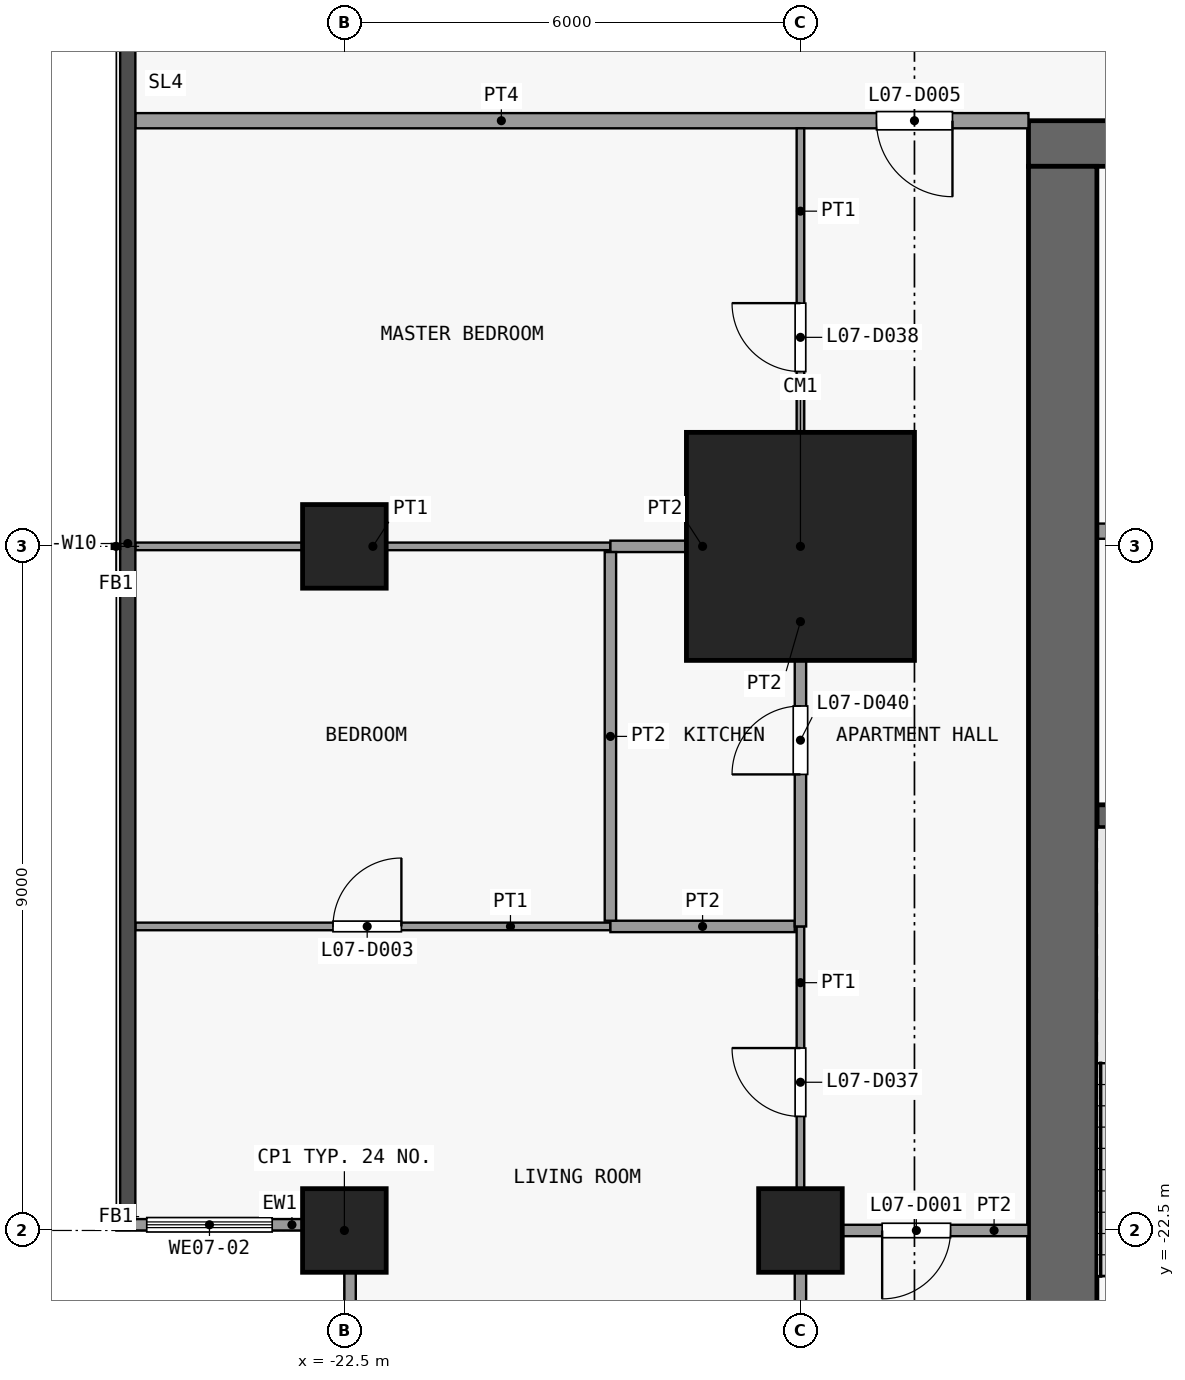
"""IFC4 building model, lengths in metres.
Left out: names, types, materials, properties, quantities, classifications, styles, units other than length and angle.
Written with IfcOpenShell. Run it as: python <this file> out.ifc"""

import sys

from ifc_helpers import new_model, si_unit, direction, frame, frame_2d, origin, origin_2d, place, context, subcontext, project, spatial, rectangle, extrude, element, fill, save


model = new_model("IFC4")
c1 = context("Model", 3, precision=1e-05, world=origin(), true_north=direction((0.0, 1.0)))
c2 = subcontext(c1, "Body", "Model", "MODEL_VIEW")
j1 = project(units=[si_unit("LENGTHUNIT", "METRE"), si_unit("PLANEANGLEUNIT", "RADIAN")], contexts=[c1])
p1 = place(None, origin())
s1 = spatial("IfcSite", under=j1, at=p1, CompositionType="ELEMENT")
p2 = place(p1, origin())
s2 = spatial("IfcBuilding", under=s1, at=p2, CompositionType="ELEMENT")
p3 = place(p2, frame((0.0, 0.0, 36.1)))
s3 = spatial("IfcBuildingStorey", under=s2, at=p3, CompositionType="ELEMENT", Elevation=36.1)
for number, where, z_axis, x_axis in (
    (1, (-22.5, -22.5, 0.0), (0.0, 0.0, 1.0), (1.0, 0.0, 0.0)),
    (2, (-22.5, -13.5, 0.0), (0.0, 0.0, 1.0), (1.0, 0.0, 0.0)),
    (3, (-16.5, -22.5, 0.0), (0.0, 0.0, 1.0), (1.0, 0.0, 0.0)),
):
    element("IfcColumn", number, at=place(p3, frame(where, z_axis=z_axis, x_axis=x_axis)), inside=s3, PredefinedType="COLUMN", context=c2, shape_type="SweptSolid", body=[
        extrude(rectangle(XDim=1.1, YDim=1.1, at=origin_2d()), origin(), (0.0, 0.0, 1.0), 3.6),
    ])
p4 = place(p3, frame((-16.5, -13.5, 0.0), z_axis=(0.0, 0.0, 1.0), x_axis=(1.0, 0.0, 0.0)))
e4 = element("IfcColumn", 4, at=p4, inside=s3, PredefinedType="COLUMN", context=c2, shape_type="SweptSolid", body=[
    extrude(rectangle(XDim=3.0, YDim=3.0, at=origin_2d()), origin(), (0.0, 0.0, 1.0), 3.6),
])
p5 = place(p3, frame((-13.5, -8.2, 0.0), z_axis=(0.0, 0.0, 1.0), x_axis=(1.0, 0.0, 0.0)))
e5 = element("IfcWall", 5, at=p5, inside=s3, PredefinedType="SHEAR", context=c2, shape_type="SweptSolid", body=[
    extrude(rectangle(XDim=27.0, YDim=0.6, at=frame_2d((13.5, 0.0))), origin(), (0.0, 0.0, 1.0), 3.3),
])
p6 = place(p5, frame((7.8, 0.0, 0.0)))
e6 = element("IfcOpeningElement", 6, at=p6, cuts=e5, PredefinedType="OPENING", context=c2, shape_type="SweptSolid", body=[
    extrude(rectangle(XDim=1.8, YDim=2.1, at=frame_2d((0.9, 1.05))), frame((0.0, 0.31, 0.0), z_axis=(0.0, -1.0, 0.0), x_axis=(1.0, 0.0, 0.0)), (0.0, 0.0, 1.0), 0.62),
])
p7 = place(p5, frame((17.4, 0.0, 0.0)))
e7 = element("IfcOpeningElement", 7, at=p7, cuts=e5, PredefinedType="OPENING", context=c2, shape_type="SweptSolid", body=[
    extrude(rectangle(XDim=1.8, YDim=2.1, at=frame_2d((0.9, 1.05))), frame((0.0, 0.31, 0.0), z_axis=(0.0, -1.0, 0.0), x_axis=(1.0, 0.0, 0.0)), (0.0, 0.0, 1.0), 0.62),
])
p8 = place(p5, frame((2.725, 0.0, 0.0)))
e8 = element("IfcOpeningElement", 8, at=p8, cuts=e5, PredefinedType="OPENING", context=c2, shape_type="SweptSolid", body=[
    extrude(rectangle(XDim=0.9, YDim=2.1, at=frame_2d((0.45, 1.05))), frame((0.0, 0.31, 0.0), z_axis=(0.0, -1.0, 0.0), x_axis=(1.0, 0.0, 0.0)), (0.0, 0.0, 1.0), 0.62),
])
p9 = place(p5, frame((23.375, 0.0, 0.0)))
e9 = element("IfcOpeningElement", 9, at=p9, cuts=e5, PredefinedType="OPENING", context=c2, shape_type="SweptSolid", body=[
    extrude(rectangle(XDim=0.9, YDim=2.1, at=frame_2d((0.45, 1.05))), frame((0.0, 0.31, 0.0), z_axis=(0.0, -1.0, 0.0), x_axis=(1.0, 0.0, 0.0)), (0.0, 0.0, 1.0), 0.62),
])
p10 = place(p3, frame((-13.05, -24.6, 0.0), z_axis=(0.0, 0.0, 1.0), x_axis=(0.0, 1.0, 0.0)))
e10 = element("IfcWall", 10, at=p10, inside=s3, PredefinedType="SHEAR", context=c2, shape_type="SweptSolid", body=[
    extrude(rectangle(XDim=16.1, YDim=0.9, at=frame_2d((8.05, 0.0))), origin(), (0.0, 0.0, 1.0), 3.3),
])
p11 = place(p3, frame((-12.6, -17.05, 0.0), z_axis=(0.0, 0.0, 1.0), x_axis=(1.0, 0.0, 0.0)))
e11 = element("IfcWall", 11, at=p11, inside=s3, PredefinedType="SHEAR", context=c2, shape_type="SweptSolid", body=[
    extrude(rectangle(XDim=2.85, YDim=0.3, at=frame_2d((1.425, 0.0))), origin(), (0.0, 0.0, 1.0), 3.3),
])
p12 = place(p3, frame((-12.6, -13.3, 0.0), z_axis=(0.0, 0.0, 1.0), x_axis=(1.0, 0.0, 0.0)))
e12 = element("IfcWall", 12, at=p12, inside=s3, PredefinedType="PARTITIONING", context=c2, shape_type="SweptSolid", body=[
    extrude(rectangle(XDim=1.45, YDim=0.2, at=frame_2d((0.725, 0.0))), origin(), (0.0, 0.0, 1.0), 3.3),
])
p13 = place(p3, frame((-22.425, -25.25, 0.0), z_axis=(0.0, 0.0, 1.0), x_axis=(0.0, 1.0, 0.0)))
e13 = element("IfcWall", 13, at=p13, inside=s3, PredefinedType="SOLIDWALL", context=c2, shape_type="SweptSolid", body=[
    extrude(rectangle(XDim=2.2, YDim=0.15, at=frame_2d((1.1, 0.0))), origin(), (0.0, 0.0, 1.0), 3.3),
])
p14 = place(p13, frame((0.4, 0.0, 0.9)))
e14 = element("IfcOpeningElement", 14, at=p14, cuts=e13, PredefinedType="OPENING", context=c2, shape_type="SweptSolid", body=[
    extrude(rectangle(XDim=1.4, YDim=2.4, at=frame_2d((0.7, 1.2))), frame((0.0, 0.085, 0.0), z_axis=(0.0, -1.0, 0.0), x_axis=(1.0, 0.0, 0.0)), (0.0, 0.0, 1.0), 0.17),
])
p15 = place(p3, frame((-23.05, -22.425, 0.0), z_axis=(0.0, 0.0, 1.0), x_axis=(-1.0, 0.0, 0.0)))
e15 = element("IfcWall", 15, at=p15, inside=s3, PredefinedType="SOLIDWALL", context=c2, shape_type="SweptSolid", body=[
    extrude(rectangle(XDim=2.45, YDim=0.15, at=frame_2d((1.225, 0.0))), origin(), (0.0, 0.0, 1.0), 3.3),
])
p16 = place(p15, frame((0.4, 0.0, 0.9)))
e16 = element("IfcOpeningElement", 16, at=p16, cuts=e15, PredefinedType="OPENING", context=c2, shape_type="SweptSolid", body=[
    extrude(rectangle(XDim=1.65, YDim=2.4, at=frame_2d((0.825, 1.2))), frame((0.0, 0.085, 0.0), z_axis=(0.0, -1.0, 0.0), x_axis=(1.0, 0.0, 0.0)), (0.0, 0.0, 1.0), 0.17),
])
p17 = place(p3, frame((-16.425, -22.5, 0.0), z_axis=(0.0, 0.0, 1.0), x_axis=(1.0, 0.0, 0.0)))
e17 = element("IfcWall", 17, at=p17, inside=s3, PredefinedType="PARTITIONING", context=c2, shape_type="SweptSolid", body=[
    extrude(rectangle(XDim=2.925, YDim=0.15, at=frame_2d((1.462, 0.0))), origin(), (0.0, 0.0, 1.0), 3.3),
])
p18 = place(p17, frame((1.0, 0.0, 0.0)))
e18 = element("IfcOpeningElement", 18, at=p18, cuts=e17, PredefinedType="OPENING", context=c2, shape_type="SweptSolid", body=[
    extrude(rectangle(XDim=0.9, YDim=2.1, at=frame_2d((0.45, 1.05))), frame((0.0, 0.085, 0.0), z_axis=(0.0, -1.0, 0.0), x_axis=(1.0, 0.0, 0.0)), (0.0, 0.0, 1.0), 0.17),
])
p19 = place(p3, frame((-25.25, -18.5, 0.0), z_axis=(0.0, 0.0, 1.0), x_axis=(1.0, 0.0, 0.0)))
e19 = element("IfcWall", 19, at=p19, inside=s3, PredefinedType="PARTITIONING", context=c2, shape_type="SweptSolid", body=[
    extrude(rectangle(XDim=6.25, YDim=0.1, at=frame_2d((3.125, 0.0))), origin(), (0.0, 0.0, 1.0), 3.3),
])
p20 = place(p19, frame((2.6, 0.0, 0.0)))
e20 = element("IfcOpeningElement", 20, at=p20, cuts=e19, PredefinedType="OPENING", context=c2, shape_type="SweptSolid", body=[
    extrude(rectangle(XDim=0.9, YDim=2.1, at=frame_2d((0.45, 1.05))), frame((0.0, 0.06, 0.0), z_axis=(0.0, -1.0, 0.0), x_axis=(1.0, 0.0, 0.0)), (0.0, 0.0, 1.0), 0.12),
])
p21 = place(p3, frame((-19.0, -18.5, 0.0), z_axis=(0.0, 0.0, 1.0), x_axis=(1.0, 0.0, 0.0)))
e21 = element("IfcWall", 21, at=p21, inside=s3, PredefinedType="PARTITIONING", context=c2, shape_type="SweptSolid", body=[
    extrude(rectangle(XDim=2.425, YDim=0.15, at=frame_2d((1.212, 0.0))), origin(), (0.0, 0.0, 1.0), 3.3),
])
p22 = place(p3, frame((-25.25, -13.5, 0.0), z_axis=(0.0, 0.0, 1.0), x_axis=(1.0, 0.0, 0.0)))
e22 = element("IfcWall", 22, at=p22, inside=s3, PredefinedType="PARTITIONING", context=c2, shape_type="SweptSolid", body=[
    extrude(rectangle(XDim=6.25, YDim=0.1, at=frame_2d((3.125, 0.0))), origin(), (0.0, 0.0, 1.0), 3.3),
])
p23 = place(p3, frame((-19.0, -13.5, 0.0), z_axis=(0.0, 0.0, 1.0), x_axis=(1.0, 0.0, 0.0)))
e23 = element("IfcWall", 23, at=p23, inside=s3, PredefinedType="PARTITIONING", context=c2, shape_type="SweptSolid", body=[
    extrude(rectangle(XDim=2.425, YDim=0.15, at=frame_2d((1.212, 0.0))), origin(), (0.0, 0.0, 1.0), 3.3),
])
p24 = place(p3, frame((-25.25, -7.9, 0.0), z_axis=(0.0, 0.0, 1.0), x_axis=(1.0, 0.0, 0.0)))
e24 = element("IfcWall", 24, at=p24, inside=s3, PredefinedType="PARTITIONING", context=c2, shape_type="SweptSolid", body=[
    extrude(rectangle(XDim=11.75, YDim=0.2, at=frame_2d((5.875, 0.0))), origin(), (0.0, 0.0, 1.0), 3.3),
])
p25 = place(p24, frame((9.75, 0.0, 0.0)))
e25 = element("IfcOpeningElement", 25, at=p25, cuts=e24, PredefinedType="OPENING", context=c2, shape_type="SweptSolid", body=[
    extrude(rectangle(XDim=1.0, YDim=2.1, at=frame_2d((0.5, 1.05))), frame((0.0, 0.11, 0.0), z_axis=(0.0, -1.0, 0.0), x_axis=(1.0, 0.0, 0.0)), (0.0, 0.0, 1.0), 0.22),
])
p26 = place(p3, frame((-19.0, -18.425, 0.0), z_axis=(0.0, 0.0, 1.0), x_axis=(0.0, 1.0, 0.0)))
e26 = element("IfcWall", 26, at=p26, inside=s3, PredefinedType="PARTITIONING", context=c2, shape_type="SweptSolid", body=[
    extrude(rectangle(XDim=4.85, YDim=0.15, at=frame_2d((2.425, 0.0))), origin(), (0.0, 0.0, 1.0), 3.3),
])
p27 = place(p3, frame((-16.5, -22.5, 0.0), z_axis=(0.0, 0.0, 1.0), x_axis=(0.0, 1.0, 0.0)))
e27 = element("IfcWall", 27, at=p27, inside=s3, PredefinedType="PARTITIONING", context=c2, shape_type="SweptSolid", body=[
    extrude(rectangle(XDim=4.0, YDim=0.1, at=frame_2d((2.0, 0.0))), origin(), (0.0, 0.0, 1.0), 3.3),
])
p28 = place(p27, frame((1.5, 0.0, 0.0)))
e28 = element("IfcOpeningElement", 28, at=p28, cuts=e27, PredefinedType="OPENING", context=c2, shape_type="SweptSolid", body=[
    extrude(rectangle(XDim=0.9, YDim=2.1, at=frame_2d((0.45, 1.05))), frame((0.0, 0.06, 0.0), z_axis=(0.0, -1.0, 0.0), x_axis=(1.0, 0.0, 0.0)), (0.0, 0.0, 1.0), 0.12),
])
p29 = place(p3, frame((-16.5, -13.5, 0.0), z_axis=(0.0, 0.0, 1.0), x_axis=(0.0, 1.0, 0.0)))
e29 = element("IfcWall", 29, at=p29, inside=s3, PredefinedType="PARTITIONING", context=c2, shape_type="SweptSolid", body=[
    extrude(rectangle(XDim=5.5, YDim=0.1, at=frame_2d((2.75, 0.0))), origin(), (0.0, 0.0, 1.0), 3.3),
])
p30 = place(p29, frame((2.3, 0.0, 0.0)))
e30 = element("IfcOpeningElement", 30, at=p30, cuts=e29, PredefinedType="OPENING", context=c2, shape_type="SweptSolid", body=[
    extrude(rectangle(XDim=0.9, YDim=2.1, at=frame_2d((0.45, 1.05))), frame((0.0, 0.06, 0.0), z_axis=(0.0, -1.0, 0.0), x_axis=(1.0, 0.0, 0.0)), (0.0, 0.0, 1.0), 0.12),
])
p31 = place(p3, frame((-16.5, -25.25, 0.0), z_axis=(0.0, 0.0, 1.0), x_axis=(0.0, 1.0, 0.0)))
e31 = element("IfcWall", 31, at=p31, inside=s3, PredefinedType="PARTITIONING", context=c2, shape_type="SweptSolid", body=[
    extrude(rectangle(XDim=2.75, YDim=0.15, at=frame_2d((1.375, 0.0))), origin(), (0.0, 0.0, 1.0), 3.3),
])
p32 = place(p3, frame((-16.5, -18.5, 0.0), z_axis=(0.0, 0.0, 1.0), x_axis=(0.0, 1.0, 0.0)))
e32 = element("IfcWall", 32, at=p32, inside=s3, PredefinedType="PARTITIONING", context=c2, shape_type="SweptSolid", body=[
    extrude(rectangle(XDim=5.0, YDim=0.15, at=frame_2d((2.5, 0.0))), origin(), (0.0, 0.0, 1.0), 3.3),
])
p33 = place(p32, frame((2.0, 0.0, 0.0)))
e33 = element("IfcOpeningElement", 33, at=p33, cuts=e32, PredefinedType="OPENING", context=c2, shape_type="SweptSolid", body=[
    extrude(rectangle(XDim=0.9, YDim=2.1, at=frame_2d((0.45, 1.05))), frame((0.0, 0.085, 0.0), z_axis=(0.0, -1.0, 0.0), x_axis=(1.0, 0.0, 0.0)), (0.0, 0.0, 1.0), 0.17),
])
p34 = place(p16, origin())
e34 = element("IfcWindow", 34, at=p34, inside=s3, PartitioningType="SINGLE_PANEL", PredefinedType="WINDOW", context=c2, shape_type="SweptSolid", body=[
    extrude(rectangle(XDim=1.65, YDim=2.4, at=frame_2d((0.825, 1.2))), frame((0.0, 0.03, 0.0), z_axis=(0.0, -1.0, 0.0), x_axis=(1.0, 0.0, 0.0)), (0.0, 0.0, 1.0), 0.06),
])
fill(e16, e34)
p35 = place(p18, origin())
e35 = element("IfcDoor", 35, at=p35, inside=s3, OperationType="SINGLE_SWING_LEFT", PredefinedType="DOOR", context=c2, shape_type="SweptSolid", body=[
    extrude(rectangle(XDim=0.9, YDim=2.1, at=frame_2d((0.45, 1.05))), frame((0.0, 0.025, 0.0), z_axis=(0.0, -1.0, 0.0), x_axis=(1.0, 0.0, 0.0)), (0.0, 0.0, 1.0), 0.05),
])
fill(e18, e35)
p36 = place(p20, origin())
e36 = element("IfcDoor", 36, at=p36, inside=s3, OperationType="SINGLE_SWING_LEFT", PredefinedType="DOOR", context=c2, shape_type="SweptSolid", body=[
    extrude(rectangle(XDim=0.9, YDim=2.1, at=frame_2d((0.45, 1.05))), frame((0.0, 0.025, 0.0), z_axis=(0.0, -1.0, 0.0), x_axis=(1.0, 0.0, 0.0)), (0.0, 0.0, 1.0), 0.05),
])
fill(e20, e36)
p37 = place(p25, origin())
e37 = element("IfcDoor", 37, at=p37, inside=s3, OperationType="SINGLE_SWING_RIGHT", PredefinedType="DOOR", context=c2, shape_type="SweptSolid", body=[
    extrude(rectangle(XDim=1.0, YDim=2.1, at=frame_2d((0.5, 1.05))), frame((0.0, 0.025, 0.0), z_axis=(0.0, -1.0, 0.0), x_axis=(1.0, 0.0, 0.0)), (0.0, 0.0, 1.0), 0.05),
])
fill(e25, e37)
p38 = place(p28, origin())
e38 = element("IfcDoor", 38, at=p38, inside=s3, OperationType="SINGLE_SWING_LEFT", PredefinedType="DOOR", context=c2, shape_type="SweptSolid", body=[
    extrude(rectangle(XDim=0.9, YDim=2.1, at=frame_2d((0.45, 1.05))), frame((0.0, 0.025, 0.0), z_axis=(0.0, -1.0, 0.0), x_axis=(1.0, 0.0, 0.0)), (0.0, 0.0, 1.0), 0.05),
])
fill(e28, e38)
p39 = place(p30, origin())
e39 = element("IfcDoor", 39, at=p39, inside=s3, OperationType="SINGLE_SWING_LEFT", PredefinedType="DOOR", context=c2, shape_type="SweptSolid", body=[
    extrude(rectangle(XDim=0.9, YDim=2.1, at=frame_2d((0.45, 1.05))), frame((0.0, 0.025, 0.0), z_axis=(0.0, -1.0, 0.0), x_axis=(1.0, 0.0, 0.0)), (0.0, 0.0, 1.0), 0.05),
])
fill(e30, e39)
p40 = place(p33, origin())
e40 = element("IfcDoor", 40, at=p40, inside=s3, OperationType="SINGLE_SWING_RIGHT", PredefinedType="DOOR", context=c2, shape_type="SweptSolid", body=[
    extrude(rectangle(XDim=0.9, YDim=2.1, at=frame_2d((0.45, 1.05))), frame((0.0, 0.025, 0.0), z_axis=(0.0, -1.0, 0.0), x_axis=(1.0, 0.0, 0.0)), (0.0, 0.0, 1.0), 0.05),
])
fill(e33, e40)
save(model, sys.argv[1])
